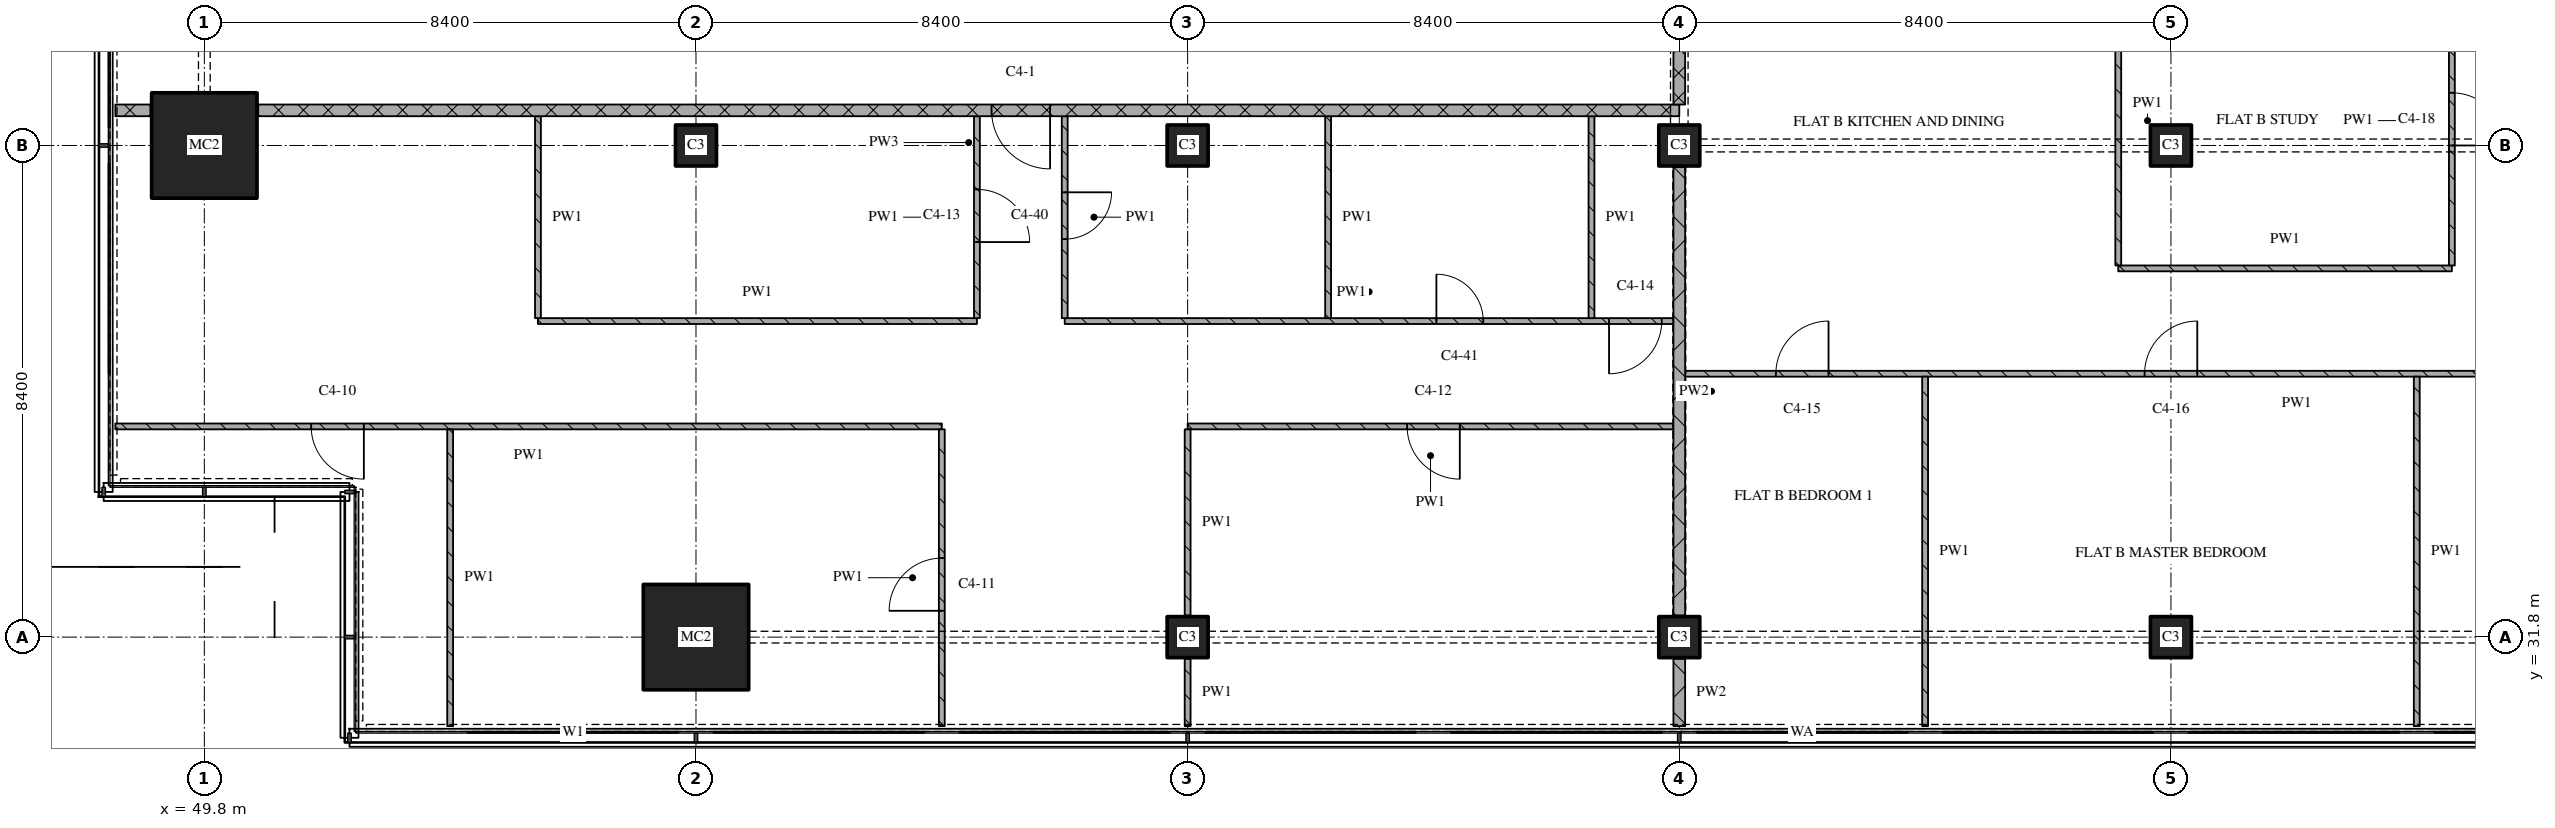
"""IFC4 building model, lengths in metres.
Left out: names, types, materials, properties, quantities, classifications, styles, units other than length and angle.
Written with IfcOpenShell. Run it as: python <this file> out.ifc"""

import sys

from ifc_helpers import new_model, si_unit, direction, frame, frame_2d, origin, origin_2d, place, context, subcontext, project, spatial, rectangle, extrude, element, fill, save


model = new_model("IFC4")
c1 = context("Model", 3, precision=1e-05, world=origin(), true_north=direction((0.0, 1.0)))
c2 = subcontext(c1, "Body", "Model", "MODEL_VIEW")
j1 = project(units=[si_unit("LENGTHUNIT", "METRE"), si_unit("PLANEANGLEUNIT", "RADIAN")], contexts=[c1])
p1 = place(None, origin())
s1 = spatial("IfcSite", under=j1, at=p1, CompositionType="ELEMENT")
p2 = place(p1, origin())
s2 = spatial("IfcBuilding", under=s1, at=p2, CompositionType="ELEMENT")
p3 = place(p2, frame((0.0, 0.0, 187.05)))
s3 = spatial("IfcBuildingStorey", under=s2, at=p3, CompositionType="ELEMENT", Elevation=187.05)
for number, where, z_axis, x_axis in (
    (1, (49.8, 40.2, 0.0), (0.0, 0.0, 1.0), (1.0, 0.0, 0.0)),
    (2, (58.2, 31.8, 0.0), (0.0, 0.0, 1.0), (1.0, 0.0, 0.0)),
):
    element("IfcColumn", number, at=place(p3, frame(where, z_axis=z_axis, x_axis=x_axis)), inside=s3, PredefinedType="COLUMN", context=c2, shape_type="SweptSolid", body=[
        extrude(rectangle(XDim=1.8, YDim=1.8, at=origin_2d()), origin(), (0.0, 0.0, 1.0), 3.6),
    ])
for number, where, z_axis, x_axis in (
    (3, (58.2, 40.2, 0.0), (0.0, 0.0, 1.0), (1.0, 0.0, 0.0)),
    (4, (66.6, 31.8, 0.0), (0.0, 0.0, 1.0), (1.0, 0.0, 0.0)),
    (5, (66.6, 40.2, 0.0), (0.0, 0.0, 1.0), (1.0, 0.0, 0.0)),
    (6, (75.0, 31.8, 0.0), (0.0, 0.0, 1.0), (1.0, 0.0, 0.0)),
    (7, (75.0, 40.2, 0.0), (0.0, 0.0, 1.0), (1.0, 0.0, 0.0)),
    (8, (83.4, 31.8, 0.0), (0.0, 0.0, 1.0), (1.0, 0.0, 0.0)),
    (9, (83.4, 40.2, 0.0), (0.0, 0.0, 1.0), (1.0, 0.0, 0.0)),
):
    element("IfcColumn", number, at=place(p3, frame(where, z_axis=z_axis, x_axis=x_axis)), inside=s3, PredefinedType="COLUMN", context=c2, shape_type="SweptSolid", body=[
        extrude(rectangle(XDim=0.7, YDim=0.7, at=origin_2d()), origin(), (0.0, 0.0, 1.0), 3.6),
    ])
p4 = place(p3, frame((62.4, 35.4, 0.0), z_axis=(0.0, 0.0, 1.0), x_axis=(-1.0, 0.0, 0.0)))
e10 = element("IfcWall", 10, at=p4, inside=s3, PredefinedType="PARTITIONING", context=c2, shape_type="SweptSolid", body=[
    extrude(rectangle(XDim=14.12, YDim=0.1, at=frame_2d((7.06, 0.0))), origin(), (0.0, 0.0, 1.0), 3.32),
])
p5 = place(p4, frame((9.875, 0.0, 0.0)))
e11 = element("IfcOpeningElement", 11, at=p5, cuts=e10, PredefinedType="OPENING", context=c2, shape_type="SweptSolid", body=[
    extrude(rectangle(XDim=0.9, YDim=2.1, at=frame_2d((0.45, 1.05))), frame((0.0, 0.06, 0.0), z_axis=(0.0, -1.0, 0.0), x_axis=(1.0, 0.0, 0.0)), (0.0, 0.0, 1.0), 0.12),
])
p6 = place(p3, frame((74.9, 35.4, 0.0), z_axis=(0.0, 0.0, 1.0), x_axis=(-1.0, 0.0, 0.0)))
e12 = element("IfcWall", 12, at=p6, inside=s3, PredefinedType="PARTITIONING", context=c2, shape_type="SweptSolid", body=[
    extrude(rectangle(XDim=8.3, YDim=0.1, at=frame_2d((4.15, 0.0))), origin(), (0.0, 0.0, 1.0), 3.32),
])
p7 = place(p6, frame((3.65, 0.0, 0.0)))
e13 = element("IfcOpeningElement", 13, at=p7, cuts=e12, PredefinedType="OPENING", context=c2, shape_type="SweptSolid", body=[
    extrude(rectangle(XDim=0.9, YDim=2.1, at=frame_2d((0.45, 1.05))), frame((0.0, 0.06, 0.0), z_axis=(0.0, -1.0, 0.0), x_axis=(1.0, 0.0, 0.0)), (0.0, 0.0, 1.0), 0.12),
])
p8 = place(p3, frame((96.0, 36.3, 0.0), z_axis=(0.0, 0.0, 1.0), x_axis=(-1.0, 0.0, 0.0)))
e14 = element("IfcWall", 14, at=p8, inside=s3, PredefinedType="PARTITIONING", context=c2, shape_type="SweptSolid", body=[
    extrude(rectangle(XDim=20.9, YDim=0.1, at=frame_2d((10.45, 0.0))), origin(), (0.0, 0.0, 1.0), 3.32),
])
p9 = place(p8, frame((12.15, 0.0, 0.0)))
e15 = element("IfcOpeningElement", 15, at=p9, cuts=e14, PredefinedType="OPENING", context=c2, shape_type="SweptSolid", body=[
    extrude(rectangle(XDim=0.9, YDim=2.1, at=frame_2d((0.45, 1.05))), frame((0.0, 0.06, 0.0), z_axis=(0.0, -1.0, 0.0), x_axis=(1.0, 0.0, 0.0)), (0.0, 0.0, 1.0), 0.12),
])
p10 = place(p8, frame((18.45, 0.0, 0.0)))
e16 = element("IfcOpeningElement", 16, at=p10, cuts=e14, PredefinedType="OPENING", context=c2, shape_type="SweptSolid", body=[
    extrude(rectangle(XDim=0.9, YDim=2.1, at=frame_2d((0.45, 1.05))), frame((0.0, 0.06, 0.0), z_axis=(0.0, -1.0, 0.0), x_axis=(1.0, 0.0, 0.0)), (0.0, 0.0, 1.0), 0.12),
])
p11 = place(p3, frame((55.5, 37.2, 0.0), z_axis=(0.0, 0.0, 1.0), x_axis=(1.0, 0.0, 0.0)))
e17 = element("IfcWall", 17, at=p11, inside=s3, PredefinedType="PARTITIONING", context=c2, shape_type="SweptSolid", body=[
    extrude(rectangle(XDim=7.5, YDim=0.1, at=frame_2d((3.75, 0.0))), origin(), (0.0, 0.0, 1.0), 3.32),
])
p12 = place(p3, frame((64.5, 37.2, 0.0), z_axis=(0.0, 0.0, 1.0), x_axis=(1.0, 0.0, 0.0)))
e18 = element("IfcWall", 18, at=p12, inside=s3, PredefinedType="PARTITIONING", context=c2, shape_type="SweptSolid", body=[
    extrude(rectangle(XDim=10.4, YDim=0.1, at=frame_2d((5.2, 0.0))), origin(), (0.0, 0.0, 1.0), 3.32),
])
p13 = place(p12, frame((6.35, 0.0, 0.0)))
e19 = element("IfcOpeningElement", 19, at=p13, cuts=e18, PredefinedType="OPENING", context=c2, shape_type="SweptSolid", body=[
    extrude(rectangle(XDim=0.8, YDim=2.1, at=frame_2d((0.4, 1.05))), frame((0.0, 0.06, 0.0), z_axis=(0.0, -1.0, 0.0), x_axis=(1.0, 0.0, 0.0)), (0.0, 0.0, 1.0), 0.12),
])
p14 = place(p12, frame((9.3, 0.0, 0.0)))
e20 = element("IfcOpeningElement", 20, at=p14, cuts=e18, PredefinedType="OPENING", context=c2, shape_type="SweptSolid", body=[
    extrude(rectangle(XDim=0.9, YDim=2.1, at=frame_2d((0.45, 1.05))), frame((0.0, 0.06, 0.0), z_axis=(0.0, -1.0, 0.0), x_axis=(1.0, 0.0, 0.0)), (0.0, 0.0, 1.0), 0.12),
])
p15 = place(p3, frame((82.5, 38.1, 0.0), z_axis=(0.0, 0.0, 1.0), x_axis=(1.0, 0.0, 0.0)))
e21 = element("IfcWall", 21, at=p15, inside=s3, PredefinedType="PARTITIONING", context=c2, shape_type="SweptSolid", body=[
    extrude(rectangle(XDim=5.7, YDim=0.1, at=frame_2d((2.85, 0.0))), origin(), (0.0, 0.0, 1.0), 3.32),
])
p16 = place(p3, frame((48.28, 40.8, 0.0), z_axis=(0.0, 0.0, 1.0), x_axis=(1.0, 0.0, 0.0)))
e22 = element("IfcWall", 22, at=p16, inside=s3, PredefinedType="PARTITIONING", context=c2, shape_type="SweptSolid", body=[
    extrude(rectangle(XDim=0.6, YDim=0.2, at=frame_2d((0.3, 0.0))), origin(), (0.0, 0.0, 1.0), 3.32),
])
p17 = place(p3, frame((75.0, 40.8, 0.0), z_axis=(0.0, 0.0, 1.0), x_axis=(-1.0, 0.0, 0.0)))
e23 = element("IfcWall", 23, at=p17, inside=s3, PredefinedType="PARTITIONING", context=c2, shape_type="SweptSolid", body=[
    extrude(rectangle(XDim=24.28, YDim=0.2, at=frame_2d((12.14, 0.0))), origin(), (0.0, 0.0, 1.0), 3.32),
])
p18 = place(p17, frame((10.75, 0.0, 0.0)))
e24 = element("IfcOpeningElement", 24, at=p18, cuts=e23, PredefinedType="OPENING", context=c2, shape_type="SweptSolid", body=[
    extrude(rectangle(XDim=1.0, YDim=2.1, at=frame_2d((0.5, 1.05))), frame((0.0, 0.11, 0.0), z_axis=(0.0, -1.0, 0.0), x_axis=(1.0, 0.0, 0.0)), (0.0, 0.0, 1.0), 0.22),
])
p19 = place(p3, frame((54.0, 35.35, 0.0), z_axis=(0.0, 0.0, 1.0), x_axis=(0.0, -1.0, 0.0)))
e25 = element("IfcWall", 25, at=p19, inside=s3, PredefinedType="PARTITIONING", context=c2, shape_type="SweptSolid", body=[
    extrude(rectangle(XDim=5.07, YDim=0.1, at=frame_2d((2.535, 0.0))), origin(), (0.0, 0.0, 1.0), 3.32),
])
p20 = place(p3, frame((55.5, 40.7, 0.0), z_axis=(0.0, 0.0, 1.0), x_axis=(0.0, -1.0, 0.0)))
e26 = element("IfcWall", 26, at=p20, inside=s3, PredefinedType="PARTITIONING", context=c2, shape_type="SweptSolid", body=[
    extrude(rectangle(XDim=3.45, YDim=0.1, at=frame_2d((1.725, 0.0))), origin(), (0.0, 0.0, 1.0), 3.32),
])
p21 = place(p3, frame((62.4, 30.28, 0.0), z_axis=(0.0, 0.0, 1.0), x_axis=(0.0, 1.0, 0.0)))
e27 = element("IfcWall", 27, at=p21, inside=s3, PredefinedType="PARTITIONING", context=c2, shape_type="SweptSolid", body=[
    extrude(rectangle(XDim=5.07, YDim=0.1, at=frame_2d((2.535, 0.0))), origin(), (0.0, 0.0, 1.0), 3.32),
])
p22 = place(p21, frame((1.97, 0.0, 0.0)))
e28 = element("IfcOpeningElement", 28, at=p22, cuts=e27, PredefinedType="OPENING", context=c2, shape_type="SweptSolid", body=[
    extrude(rectangle(XDim=0.9, YDim=2.1, at=frame_2d((0.45, 1.05))), frame((0.0, 0.06, 0.0), z_axis=(0.0, -1.0, 0.0), x_axis=(1.0, 0.0, 0.0)), (0.0, 0.0, 1.0), 0.12),
])
p23 = place(p3, frame((63.0, 37.25, 0.0), z_axis=(0.0, 0.0, 1.0), x_axis=(0.0, 1.0, 0.0)))
e29 = element("IfcWall", 29, at=p23, inside=s3, PredefinedType="PARTITIONING", context=c2, shape_type="SweptSolid", body=[
    extrude(rectangle(XDim=3.45, YDim=0.1, at=frame_2d((1.725, 0.0))), origin(), (0.0, 0.0, 1.0), 3.32),
])
p24 = place(p23, frame((1.3, 0.0, 0.0)))
e30 = element("IfcOpeningElement", 30, at=p24, cuts=e29, PredefinedType="OPENING", context=c2, shape_type="SweptSolid", body=[
    extrude(rectangle(XDim=0.9, YDim=2.1, at=frame_2d((0.45, 1.05))), frame((0.0, 0.06, 0.0), z_axis=(0.0, -1.0, 0.0), x_axis=(1.0, 0.0, 0.0)), (0.0, 0.0, 1.0), 0.12),
])
p25 = place(p3, frame((64.5, 40.7, 0.0), z_axis=(0.0, 0.0, 1.0), x_axis=(0.0, -1.0, 0.0)))
e31 = element("IfcWall", 31, at=p25, inside=s3, PredefinedType="PARTITIONING", context=c2, shape_type="SweptSolid", body=[
    extrude(rectangle(XDim=3.45, YDim=0.1, at=frame_2d((1.725, 0.0))), origin(), (0.0, 0.0, 1.0), 3.32),
])
p26 = place(p25, frame((1.3, 0.0, 0.0)))
e32 = element("IfcOpeningElement", 32, at=p26, cuts=e31, PredefinedType="OPENING", context=c2, shape_type="SweptSolid", body=[
    extrude(rectangle(XDim=0.8, YDim=2.1, at=frame_2d((0.4, 1.05))), frame((0.0, 0.06, 0.0), z_axis=(0.0, -1.0, 0.0), x_axis=(1.0, 0.0, 0.0)), (0.0, 0.0, 1.0), 0.12),
])
p27 = place(p3, frame((66.6, 31.43, 0.0), z_axis=(0.0, 0.0, 1.0), x_axis=(0.0, -1.0, 0.0)))
e33 = element("IfcWall", 33, at=p27, inside=s3, PredefinedType="PARTITIONING", context=c2, shape_type="SweptSolid", body=[
    extrude(rectangle(XDim=1.15, YDim=0.1, at=frame_2d((0.575, 0.0))), origin(), (0.0, 0.0, 1.0), 3.32),
])
p28 = place(p3, frame((66.6, 35.35, 0.0), z_axis=(0.0, 0.0, 1.0), x_axis=(0.0, -1.0, 0.0)))
e34 = element("IfcWall", 34, at=p28, inside=s3, PredefinedType="PARTITIONING", context=c2, shape_type="SweptSolid", body=[
    extrude(rectangle(XDim=3.18, YDim=0.1, at=frame_2d((1.59, 0.0))), origin(), (0.0, 0.0, 1.0), 3.32),
])
for number, where, z_axis, x_axis in (
    (35, (69.0, 40.7, 0.0), (0.0, 0.0, 1.0), (0.0, -1.0, 0.0)),
    (36, (73.5, 40.7, 0.0), (0.0, 0.0, 1.0), (0.0, -1.0, 0.0)),
):
    element("IfcWall", number, at=place(p3, frame(where, z_axis=z_axis, x_axis=x_axis)), inside=s3, PredefinedType="PARTITIONING", context=c2, shape_type="SweptSolid", body=[
        extrude(rectangle(XDim=3.45, YDim=0.1, at=frame_2d((1.725, 0.0))), origin(), (0.0, 0.0, 1.0), 3.32),
    ])
p29 = place(p3, frame((75.0, 43.1, 0.0), z_axis=(0.0, 0.0, 1.0), x_axis=(0.0, -1.0, 0.0)))
e37 = element("IfcWall", 37, at=p29, inside=s3, PredefinedType="PARTITIONING", context=c2, shape_type="SweptSolid", body=[
    extrude(rectangle(XDim=2.2, YDim=0.2, at=frame_2d((1.1, 0.0))), origin(), (0.0, 0.0, 1.0), 2.43),
])
p30 = place(p3, frame((75.0, 31.43, 0.0), z_axis=(0.0, 0.0, 1.0), x_axis=(0.0, -1.0, 0.0)))
e38 = element("IfcWall", 38, at=p30, inside=s3, PredefinedType="PARTITIONING", context=c2, shape_type="SweptSolid", body=[
    extrude(rectangle(XDim=1.15, YDim=0.2, at=frame_2d((0.575, 0.0))), origin(), (0.0, 0.0, 1.0), 3.32),
])
p31 = place(p3, frame((75.0, 39.83, 0.0), z_axis=(0.0, 0.0, 1.0), x_axis=(0.0, -1.0, 0.0)))
e39 = element("IfcWall", 39, at=p31, inside=s3, PredefinedType="PARTITIONING", context=c2, shape_type="SweptSolid", body=[
    extrude(rectangle(XDim=7.66, YDim=0.2, at=frame_2d((3.83, 0.0))), origin(), (0.0, 0.0, 1.0), 2.72),
])
p32 = place(p3, frame((79.2, 36.25, 0.0), z_axis=(0.0, 0.0, 1.0), x_axis=(0.0, -1.0, 0.0)))
e40 = element("IfcWall", 40, at=p32, inside=s3, PredefinedType="PARTITIONING", context=c2, shape_type="SweptSolid", body=[
    extrude(rectangle(XDim=5.97, YDim=0.1, at=frame_2d((2.985, 0.0))), origin(), (0.0, 0.0, 1.0), 3.32),
])
p33 = place(p3, frame((82.5, 43.1, 0.0), z_axis=(0.0, 0.0, 1.0), x_axis=(0.0, -1.0, 0.0)))
e41 = element("IfcWall", 41, at=p33, inside=s3, PredefinedType="PARTITIONING", context=c2, shape_type="SweptSolid", body=[
    extrude(rectangle(XDim=4.95, YDim=0.1, at=frame_2d((2.475, 0.0))), origin(), (0.0, 0.0, 1.0), 3.32),
])
p34 = place(p3, frame((87.6, 36.25, 0.0), z_axis=(0.0, 0.0, 1.0), x_axis=(0.0, -1.0, 0.0)))
e42 = element("IfcWall", 42, at=p34, inside=s3, PredefinedType="PARTITIONING", context=c2, shape_type="SweptSolid", body=[
    extrude(rectangle(XDim=5.97, YDim=0.1, at=frame_2d((2.985, 0.0))), origin(), (0.0, 0.0, 1.0), 3.32),
])
p35 = place(p3, frame((88.2, 38.15, 0.0), z_axis=(0.0, 0.0, 1.0), x_axis=(0.0, 1.0, 0.0)))
e43 = element("IfcWall", 43, at=p35, inside=s3, PredefinedType="PARTITIONING", context=c2, shape_type="SweptSolid", body=[
    extrude(rectangle(XDim=4.95, YDim=0.1, at=frame_2d((2.475, 0.0))), origin(), (0.0, 0.0, 1.0), 3.32),
])
p36 = place(p35, frame((2.05, 0.0, 0.0)))
e44 = element("IfcOpeningElement", 44, at=p36, cuts=e43, PredefinedType="OPENING", context=c2, shape_type="SweptSolid", body=[
    extrude(rectangle(XDim=0.9, YDim=2.1, at=frame_2d((0.45, 1.05))), frame((0.0, 0.06, 0.0), z_axis=(0.0, -1.0, 0.0), x_axis=(1.0, 0.0, 0.0)), (0.0, 0.0, 1.0), 0.12),
])
p37 = place(p5, origin())
e45 = element("IfcDoor", 45, at=p37, inside=s3, OperationType="SINGLE_SWING_LEFT", PredefinedType="DOOR", context=c2, shape_type="SweptSolid", body=[
    extrude(rectangle(XDim=0.9, YDim=2.1, at=frame_2d((0.45, 1.05))), frame((0.0, 0.025, 0.0), z_axis=(0.0, -1.0, 0.0), x_axis=(1.0, 0.0, 0.0)), (0.0, 0.0, 1.0), 0.05),
])
fill(e11, e45)
p38 = place(p7, origin())
e46 = element("IfcDoor", 46, at=p38, inside=s3, OperationType="SINGLE_SWING_LEFT", PredefinedType="DOOR", context=c2, shape_type="SweptSolid", body=[
    extrude(rectangle(XDim=0.9, YDim=2.1, at=frame_2d((0.45, 1.05))), frame((0.0, 0.025, 0.0), z_axis=(0.0, -1.0, 0.0), x_axis=(1.0, 0.0, 0.0)), (0.0, 0.0, 1.0), 0.05),
])
fill(e13, e46)
p39 = place(p9, origin())
e47 = element("IfcDoor", 47, at=p39, inside=s3, OperationType="SINGLE_SWING_RIGHT", PredefinedType="DOOR", context=c2, shape_type="SweptSolid", body=[
    extrude(rectangle(XDim=0.9, YDim=2.1, at=frame_2d((0.45, 1.05))), frame((0.0, 0.025, 0.0), z_axis=(0.0, -1.0, 0.0), x_axis=(1.0, 0.0, 0.0)), (0.0, 0.0, 1.0), 0.05),
])
fill(e15, e47)
p40 = place(p10, origin())
e48 = element("IfcDoor", 48, at=p40, inside=s3, OperationType="SINGLE_SWING_RIGHT", PredefinedType="DOOR", context=c2, shape_type="SweptSolid", body=[
    extrude(rectangle(XDim=0.9, YDim=2.1, at=frame_2d((0.45, 1.05))), frame((0.0, 0.025, 0.0), z_axis=(0.0, -1.0, 0.0), x_axis=(1.0, 0.0, 0.0)), (0.0, 0.0, 1.0), 0.05),
])
fill(e16, e48)
p41 = place(p13, origin())
e49 = element("IfcDoor", 49, at=p41, inside=s3, OperationType="SINGLE_SWING_LEFT", PredefinedType="DOOR", context=c2, shape_type="SweptSolid", body=[
    extrude(rectangle(XDim=0.8, YDim=2.1, at=frame_2d((0.4, 1.05))), frame((0.0, 0.025, 0.0), z_axis=(0.0, -1.0, 0.0), x_axis=(1.0, 0.0, 0.0)), (0.0, 0.0, 1.0), 0.05),
])
fill(e19, e49)
p42 = place(p14, origin())
e50 = element("IfcDoor", 50, at=p42, inside=s3, OperationType="SINGLE_SWING_RIGHT", PredefinedType="DOOR", context=c2, shape_type="SweptSolid", body=[
    extrude(rectangle(XDim=0.9, YDim=2.1, at=frame_2d((0.45, 1.05))), frame((0.0, 0.025, 0.0), z_axis=(0.0, -1.0, 0.0), x_axis=(1.0, 0.0, 0.0)), (0.0, 0.0, 1.0), 0.05),
])
fill(e20, e50)
p43 = place(p18, origin())
e51 = element("IfcDoor", 51, at=p43, inside=s3, OperationType="SINGLE_SWING_LEFT", PredefinedType="DOOR", context=c2, shape_type="SweptSolid", body=[
    extrude(rectangle(XDim=1.0, YDim=2.1, at=frame_2d((0.5, 1.05))), frame((0.0, 0.025, 0.0), z_axis=(0.0, -1.0, 0.0), x_axis=(1.0, 0.0, 0.0)), (0.0, 0.0, 1.0), 0.05),
])
fill(e24, e51)
p44 = place(p22, origin())
e52 = element("IfcDoor", 52, at=p44, inside=s3, OperationType="SINGLE_SWING_LEFT", PredefinedType="DOOR", context=c2, shape_type="SweptSolid", body=[
    extrude(rectangle(XDim=0.9, YDim=2.1, at=frame_2d((0.45, 1.05))), frame((0.0, 0.025, 0.0), z_axis=(0.0, -1.0, 0.0), x_axis=(1.0, 0.0, 0.0)), (0.0, 0.0, 1.0), 0.05),
])
fill(e28, e52)
p45 = place(p24, origin())
e53 = element("IfcDoor", 53, at=p45, inside=s3, OperationType="SINGLE_SWING_RIGHT", PredefinedType="DOOR", context=c2, shape_type="SweptSolid", body=[
    extrude(rectangle(XDim=0.9, YDim=2.1, at=frame_2d((0.45, 1.05))), frame((0.0, 0.025, 0.0), z_axis=(0.0, -1.0, 0.0), x_axis=(1.0, 0.0, 0.0)), (0.0, 0.0, 1.0), 0.05),
])
fill(e30, e53)
p46 = place(p26, origin())
e54 = element("IfcDoor", 54, at=p46, inside=s3, OperationType="SINGLE_SWING_LEFT", PredefinedType="DOOR", context=c2, shape_type="SweptSolid", body=[
    extrude(rectangle(XDim=0.8, YDim=2.1, at=frame_2d((0.4, 1.05))), frame((0.0, 0.025, 0.0), z_axis=(0.0, -1.0, 0.0), x_axis=(1.0, 0.0, 0.0)), (0.0, 0.0, 1.0), 0.05),
])
fill(e32, e54)
p47 = place(p36, origin())
e55 = element("IfcDoor", 55, at=p47, inside=s3, OperationType="SINGLE_SWING_RIGHT", PredefinedType="DOOR", context=c2, shape_type="SweptSolid", body=[
    extrude(rectangle(XDim=0.9, YDim=2.1, at=frame_2d((0.45, 1.05))), frame((0.0, 0.025, 0.0), z_axis=(0.0, -1.0, 0.0), x_axis=(1.0, 0.0, 0.0)), (0.0, 0.0, 1.0), 0.05),
])
fill(e44, e55)
save(model, sys.argv[1])
